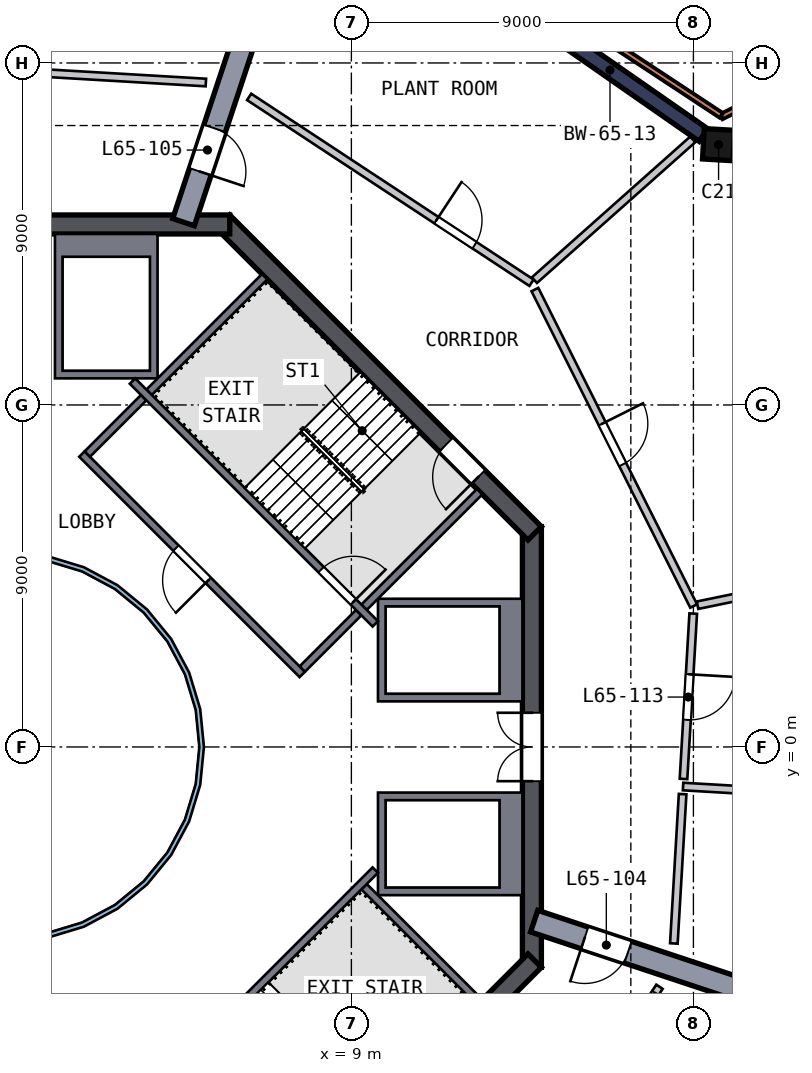
"""IFC4 building model, lengths in metres.
Left out: names, types, materials, properties, quantities, classifications, styles, units other than length and angle.
Written with IfcOpenShell. Run it as: python <this file> out.ifc"""

import sys

from ifc_helpers import new_model, si_unit, direction, frame, frame_2d, origin, origin_2d, place, context, subcontext, project, spatial, polyline, rectangle, outline, extrude, element, fill, save


model = new_model("IFC4")
c1 = context("Model", 3, precision=1e-05, world=origin(), true_north=direction((0.0, 1.0)))
c2 = subcontext(c1, "Body", "Model", "MODEL_VIEW")
j1 = project(units=[si_unit("LENGTHUNIT", "METRE"), si_unit("PLANEANGLEUNIT", "RADIAN")], contexts=[c1])
p1 = place(None, origin())
s1 = spatial("IfcSite", under=j1, at=p1, CompositionType="ELEMENT")
p2 = place(p1, origin())
s2 = spatial("IfcBuilding", under=s1, at=p2, CompositionType="ELEMENT")
p3 = place(p2, frame((0.0, 0.0, 263.0)))
s3 = spatial("IfcBuildingStorey", under=s2, at=p3, CompositionType="ELEMENT", Elevation=263.0)
p4 = place(p3, frame((18.716, 15.788, 0.0), z_axis=(-0.044438242, 0.05179951, 0.997668308), x_axis=(0.997291806, -0.056281729, 0.047343652)))
e1 = element("IfcColumn", 1, at=p4, inside=s3, PredefinedType="COLUMN", context=c2, shape_type="SweptSolid", body=[
    extrude(rectangle(XDim=0.8, YDim=0.8, at=origin_2d()), origin(), (0.0, 0.0, 1.0), 4.51),
])
p5 = place(p3, frame((13.75, -5.799, 0.0), z_axis=(0.0, 0.0, 1.0), x_axis=(0.0, 1.0, 0.0)))
e2 = element("IfcWall", 2, at=p5, inside=s3, PredefinedType="SHEAR", context=c2, shape_type="SweptSolid", body=[
    extrude(rectangle(XDim=11.598, YDim=0.5, at=frame_2d((5.799, 0.0))), origin(), (0.0, 0.0, 1.0), 6.0),
])
p6 = place(p5, frame((4.899, 0.0, 0.0)))
e3 = element("IfcOpeningElement", 3, at=p6, cuts=e2, PredefinedType="OPENING", context=c2, shape_type="SweptSolid", body=[
    extrude(rectangle(XDim=1.8, YDim=2.1, at=frame_2d((0.9, 1.05))), frame((0.0, 0.26, 0.0), z_axis=(0.0, -1.0, 0.0), x_axis=(1.0, 0.0, 0.0)), (0.0, 0.0, 1.0), 0.52),
])
p7 = place(p3, frame((13.823, 5.622, 0.0), z_axis=(0.0, 0.0, 1.0), x_axis=(-0.707106781, 0.707106781, 0.0)))
e4 = element("IfcWall", 4, at=p7, inside=s3, PredefinedType="SHEAR", context=c2, shape_type="SweptSolid", body=[
    extrude(rectangle(XDim=11.598, YDim=0.5, at=frame_2d((5.799, 0.0))), origin(), (0.0, 0.0, 1.0), 6.0),
])
p8 = place(p7, frame((2.099, 0.0, 0.0)))
e5 = element("IfcOpeningElement", 5, at=p8, cuts=e4, PredefinedType="OPENING", context=c2, shape_type="SweptSolid", body=[
    extrude(rectangle(XDim=1.2, YDim=2.1, at=frame_2d((0.6, 1.05))), frame((0.0, 0.26, 0.0), z_axis=(0.0, -1.0, 0.0), x_axis=(1.0, 0.0, 0.0)), (0.0, 0.0, 1.0), 0.52),
])
p9 = place(p3, frame((5.799, 13.75, 0.0), z_axis=(0.0, 0.0, 1.0), x_axis=(-1.0, 0.0, 0.0)))
e6 = element("IfcWall", 6, at=p9, inside=s3, PredefinedType="SHEAR", context=c2, shape_type="SweptSolid", body=[
    extrude(rectangle(XDim=11.598, YDim=0.5, at=frame_2d((5.799, 0.0))), origin(), (0.0, 0.0, 1.0), 6.0),
])
p10 = place(p9, frame((4.899, 0.0, 0.0)))
e7 = element("IfcOpeningElement", 7, at=p10, cuts=e6, PredefinedType="OPENING", context=c2, shape_type="SweptSolid", body=[
    extrude(rectangle(XDim=1.8, YDim=2.1, at=frame_2d((0.9, 1.05))), frame((0.0, 0.26, 0.0), z_axis=(0.0, -1.0, 0.0), x_axis=(1.0, 0.0, 0.0)), (0.0, 0.0, 1.0), 0.52),
])
p11 = place(p3, frame((5.622, -13.823, 0.0), z_axis=(0.0, 0.0, 1.0), x_axis=(0.707106781, 0.707106781, 0.0)))
e8 = element("IfcWall", 8, at=p11, inside=s3, PredefinedType="SHEAR", context=c2, shape_type="SweptSolid", body=[
    extrude(rectangle(XDim=11.598, YDim=0.5, at=frame_2d((5.799, 0.0))), origin(), (0.0, 0.0, 1.0), 6.0),
])
p12 = place(p11, frame((2.099, 0.0, 0.0)))
e9 = element("IfcOpeningElement", 9, at=p12, cuts=e8, PredefinedType="OPENING", context=c2, shape_type="SweptSolid", body=[
    extrude(rectangle(XDim=1.2, YDim=2.1, at=frame_2d((0.6, 1.05))), frame((0.0, 0.26, 0.0), z_axis=(0.0, -1.0, 0.0), x_axis=(1.0, 0.0, 0.0)), (0.0, 0.0, 1.0), 0.52),
])
p13 = place(p3, frame((18.264, 16.102, 0.0), z_axis=(0.0, 0.0, 1.0), x_axis=(-0.820712508, 0.571341386, 0.0)))
e10 = element("IfcWall", 10, at=p13, inside=s3, PredefinedType="SHEAR", context=c2, shape_type="SweptSolid", body=[
    extrude(rectangle(XDim=5.993, YDim=0.4, at=frame_2d((2.996, 0.0))), origin(), (0.0, 0.0, 1.0), 4.5),
])
p14 = place(p3, frame((13.81, -4.583, 0.0), z_axis=(0.0, 0.0, 1.0), x_axis=(0.949093112, -0.314995658, 0.0)))
e11 = element("IfcWall", 11, at=p14, inside=s3, PredefinedType="SHEAR", context=c2, shape_type="SweptSolid", body=[
    extrude(rectangle(XDim=9.335, YDim=0.6, at=frame_2d((4.667, 0.0))), origin(), (0.0, 0.0, 1.0), 4.5),
])
p15 = place(p14, frame((1.4, 0.0, 0.0)))
e12 = element("IfcOpeningElement", 12, at=p15, cuts=e11, PredefinedType="OPENING", context=c2, shape_type="SweptSolid", body=[
    extrude(rectangle(XDim=1.2, YDim=2.1, at=frame_2d((0.6, 1.05))), frame((0.0, 0.31, 0.0), z_axis=(0.0, -1.0, 0.0), x_axis=(1.0, 0.0, 0.0)), (0.0, 0.0, 1.0), 0.62),
])
p16 = place(p3, frame((4.583, 13.81, 0.0), z_axis=(0.0, 0.0, 1.0), x_axis=(0.314995658, 0.949093112, 0.0)))
e13 = element("IfcWall", 13, at=p16, inside=s3, PredefinedType="SHEAR", context=c2, shape_type="SweptSolid", body=[
    extrude(rectangle(XDim=9.335, YDim=0.6, at=frame_2d((4.667, 0.0))), origin(), (0.0, 0.0, 1.0), 4.5),
])
p17 = place(p16, frame((1.4, 0.0, 0.0)))
e14 = element("IfcOpeningElement", 14, at=p17, cuts=e13, PredefinedType="OPENING", context=c2, shape_type="SweptSolid", body=[
    extrude(rectangle(XDim=1.2, YDim=2.1, at=frame_2d((0.6, 1.05))), frame((0.0, 0.31, 0.0), z_axis=(0.0, -1.0, 0.0), x_axis=(1.0, 0.0, 0.0)), (0.0, 0.0, 1.0), 0.62),
])
p18 = place(p3, frame((25.046, 19.752, 0.0), z_axis=(0.0, 0.0, 1.0), x_axis=(-0.893845478, -0.448375134, 0.0)))
e15 = element("IfcWall", 15, at=p18, inside=s3, PredefinedType="SOLIDWALL", context=c2, shape_type="SweptSolid", body=[
    extrude(rectangle(XDim=7.06, YDim=0.15, at=frame_2d((3.53, 0.0))), origin(), (0.0, 0.0, 1.0), 4.5),
])
p19 = place(p3, frame((18.737, 16.618, 0.0), z_axis=(0.0, 0.0, 1.0), x_axis=(-0.835226418, 0.549906202, 0.0)))
e16 = element("IfcWall", 16, at=p19, inside=s3, PredefinedType="SOLIDWALL", context=c2, shape_type="SweptSolid", body=[
    extrude(rectangle(XDim=13.046, YDim=0.15, at=frame_2d((6.523, 0.0))), origin(), (0.0, 0.0, 1.0), 4.5),
])
p20 = place(p3, origin())
e17 = element("IfcWall", 17, at=p20, inside=s3, PredefinedType="SOLIDWALL", context=c2, shape_type="SweptSolid", body=[
    extrude(outline(polyline([(13.5, -1.2), (13.5, -3.9), (9.7, -3.9), (9.7, -1.2), (13.5, -1.2)]), holes=[polyline([(9.9, -3.7), (12.9, -3.7), (12.9, -1.4), (9.9, -1.4), (9.9, -3.7)])]), origin(), (0.0, 0.0, 1.0), 5.55),
])
p21 = place(p3, origin())
e18 = element("IfcWall", 18, at=p21, inside=s3, PredefinedType="SOLIDWALL", context=c2, shape_type="SweptSolid", body=[
    extrude(outline(polyline([(9.7, 3.9), (13.5, 3.9), (13.5, 1.2), (9.7, 1.2), (9.7, 3.9)]), holes=[polyline([(12.9, 1.4), (12.9, 3.7), (9.9, 3.7), (9.9, 1.4), (12.9, 1.4)])]), origin(), (0.0, 0.0, 1.0), 5.55),
])
p22 = place(p3, origin())
e19 = element("IfcWall", 19, at=p22, inside=s3, PredefinedType="SOLIDWALL", context=c2, shape_type="SweptSolid", body=[
    extrude(outline(polyline([(1.2, 13.5), (3.9, 13.5), (3.9, 9.7), (1.2, 9.7), (1.2, 13.5)]), holes=[polyline([(3.7, 9.9), (3.7, 12.9), (1.4, 12.9), (1.4, 9.9), (3.7, 9.9)])]), origin(), (0.0, 0.0, 1.0), 5.55),
])
p23 = place(p3, frame((3.24, 9.629, 0.0), z_axis=(0.0, 0.0, 1.0), x_axis=(0.707106781, -0.707106781, 0.0)))
e20 = element("IfcWall", 20, at=p23, inside=s3, PredefinedType="SOLIDWALL", context=c2, shape_type="SweptSolid", body=[
    extrude(rectangle(XDim=9.036, YDim=0.2, at=frame_2d((4.518, 0.0))), origin(), (0.0, 0.0, 1.0), 5.55),
])
p24 = place(p23, frame((7.018, 0.0, 0.0)))
e21 = element("IfcOpeningElement", 21, at=p24, cuts=e20, PredefinedType="OPENING", context=c2, shape_type="SweptSolid", body=[
    extrude(rectangle(XDim=1.2, YDim=2.1, at=frame_2d((0.6, 1.05))), frame((0.0, 0.11, 0.0), z_axis=(0.0, -1.0, 0.0), x_axis=(1.0, 0.0, 0.0)), (0.0, 0.0, 1.0), 0.22),
])
for number, where, z_axis, x_axis in (
    (22, (9.334, 3.677, 0.0), (0.0, 0.0, 1.0), (0.707, 0.707, 0.0)),
    (23, (3.677, 9.334, 0.0), (0.0, 0.0, 1.0), (0.707, 0.707, 0.0)),
):
    element("IfcWall", number, at=place(p3, frame(where, z_axis=z_axis, x_axis=x_axis)), inside=s3, PredefinedType="SOLIDWALL", context=c2, shape_type="SweptSolid", body=[
        extrude(rectangle(XDim=4.3, YDim=0.2, at=frame_2d((2.15, 0.0))), origin(), (0.0, 0.0, 1.0), 5.55),
    ])
p25 = place(p3, frame((9.629, -3.24, 0.0), z_axis=(0.0, 0.0, 1.0), x_axis=(-0.707120946, -0.707092617, 0.0)))
e24 = element("IfcWall", 24, at=p25, inside=s3, PredefinedType="SOLIDWALL", context=c2, shape_type="SweptSolid", body=[
    extrude(rectangle(XDim=8.618, YDim=0.2, at=frame_2d((4.309, 0.0))), origin(), (0.0, 0.0, 1.0), 5.55),
])
p26 = place(p25, frame((7.018, 0.0, 0.0)))
e25 = element("IfcOpeningElement", 25, at=p26, cuts=e24, PredefinedType="OPENING", context=c2, shape_type="SweptSolid", body=[
    extrude(rectangle(XDim=1.2, YDim=2.1, at=frame_2d((0.6, 1.05))), frame((0.0, 0.11, 0.0), z_axis=(0.0, -1.0, 0.0), x_axis=(1.0, 0.0, 0.0)), (0.0, 0.0, 1.0), 0.22),
])
p27 = place(p3, frame((9.334, -3.677, 0.0), z_axis=(0.0, 0.0, 1.0), x_axis=(0.707135168, -0.707078393, 0.0)))
e26 = element("IfcWall", 26, at=p27, inside=s3, PredefinedType="SOLIDWALL", context=c2, shape_type="SweptSolid", body=[
    extrude(rectangle(XDim=4.3, YDim=0.2, at=frame_2d((2.15, 0.0))), origin(), (0.0, 0.0, 1.0), 5.55),
])
p28 = place(p3, frame((7.708, 1.909, 0.0), z_axis=(0.0, 0.0, 1.0), x_axis=(-0.707106781, 0.707106781, 0.0)))
e27 = element("IfcWall", 27, at=p28, inside=s3, PredefinedType="SOLIDWALL", context=c2, shape_type="SweptSolid", body=[
    extrude(rectangle(XDim=8.2, YDim=0.2, at=frame_2d((4.1, 0.0))), origin(), (0.0, 0.0, 1.0), 5.55),
])
p29 = place(p28, frame((3.5, 0.0, 0.0)))
e28 = element("IfcOpeningElement", 28, at=p29, cuts=e27, PredefinedType="OPENING", context=c2, shape_type="SweptSolid", body=[
    extrude(rectangle(XDim=1.2, YDim=2.1, at=frame_2d((0.6, 1.05))), frame((0.0, 0.11, 0.0), z_axis=(0.0, -1.0, 0.0), x_axis=(1.0, 0.0, 0.0)), (0.0, 0.0, 1.0), 0.22),
])
for number, where, z_axis, x_axis in (
    (29, (7.708, 2.051, 0.0), (0.0, 0.0, 1.0), (0.707, 0.707, 0.0)),
    (30, (2.051, 7.708, 0.0), (0.0, 0.0, 1.0), (0.707, 0.707, 0.0)),
):
    element("IfcWall", number, at=place(p3, frame(where, z_axis=z_axis, x_axis=x_axis)), inside=s3, PredefinedType="SOLIDWALL", context=c2, shape_type="SweptSolid", body=[
        extrude(rectangle(XDim=2.1, YDim=0.2, at=frame_2d((1.05, 0.0))), origin(), (0.0, 0.0, 1.0), 5.55),
    ])
p30 = place(p3, origin())
e31 = element("IfcWall", 31, at=p30, inside=s3, PredefinedType="SOLIDWALL", context=c2, shape_type="SweptSolid", body=[
    extrude(outline(polyline([(5.021, -0.999), (4.73, -1.959), (4.257, -2.844), (3.62, -3.62), (2.844, -4.257), (1.959, -4.73), (0.999, -5.021), (0.0, -5.12), (-0.999, -5.021), (-1.959, -4.73), (-2.844, -4.257), (-3.62, -3.62), (-4.257, -2.844), (-4.73, -1.959), (-5.021, -0.999), (-5.12, 0.0), (-5.021, 0.999), (-4.73, 1.959), (-4.257, 2.844), (-3.62, 3.62), (-2.844, 4.257), (-1.959, 4.73), (-0.999, 5.021), (0.0, 5.12), (0.999, 5.021), (1.959, 4.73), (2.844, 4.257), (3.62, 3.62), (4.257, 2.844), (4.73, 1.959), (5.021, 0.999), (5.12, 0.0), (5.021, -0.999)]), holes=[polyline([(4.904, 0.976), (4.619, 1.913), (4.157, 2.778), (3.535, 3.535), (2.778, 4.157), (1.913, 4.619), (0.976, 4.904), (0.0, 5.0), (-0.976, 4.904), (-1.913, 4.619), (-2.778, 4.157), (-3.535, 3.535), (-4.157, 2.778), (-4.619, 1.913), (-4.904, 0.976), (-5.0, 0.0), (-4.904, -0.976), (-4.619, -1.913), (-4.157, -2.778), (-3.535, -3.535), (-2.778, -4.157), (-1.913, -4.619), (-0.976, -4.904), (0.0, -5.0), (0.976, -4.904), (1.913, -4.619), (2.778, -4.157), (3.535, -3.535), (4.157, -2.778), (4.619, -1.913), (4.904, -0.976), (5.0, 0.0), (4.904, 0.976)])]), origin(), (0.0, 0.0, 1.0), 5.55),
])
p31 = place(p3, frame((-3.089, 17.97, 0.0), z_axis=(0.0, 0.0, 1.0), x_axis=(0.998281387, -0.058602667, 0.0)))
e32 = element("IfcWall", 32, at=p31, inside=s3, PredefinedType="SOLIDWALL", context=c2, shape_type="SweptSolid", body=[
    extrude(rectangle(XDim=8.274, YDim=0.2, at=frame_2d((4.137, 0.0))), origin(), (0.0, 0.0, 1.0), 4.5),
])
p32 = place(p31, frame((0.2, 0.0, 0.0)))
e33 = element("IfcOpeningElement", 33, at=p32, cuts=e32, PredefinedType="OPENING", context=c2, shape_type="SweptSolid", body=[
    extrude(rectangle(XDim=1.2, YDim=2.1, at=frame_2d((0.6, 1.05))), frame((0.0, 0.11, 0.0), z_axis=(0.0, -1.0, 0.0), x_axis=(1.0, 0.0, 0.0)), (0.0, 0.0, 1.0), 0.22),
])
p33 = place(p3, frame((6.31, 17.107, 0.0), z_axis=(0.0, 0.0, 1.0), x_axis=(0.835228667, -0.549902786, 0.0)))
e34 = element("IfcWall", 34, at=p33, inside=s3, PredefinedType="SOLIDWALL", context=c2, shape_type="SweptSolid", body=[
    extrude(rectangle(XDim=8.896, YDim=0.2, at=frame_2d((4.448, 0.0))), origin(), (0.0, 0.0, 1.0), 4.5),
])
p34 = place(p33, frame((5.9, 0.0, 0.0)))
e35 = element("IfcOpeningElement", 35, at=p34, cuts=e34, PredefinedType="OPENING", context=c2, shape_type="SweptSolid", body=[
    extrude(rectangle(XDim=1.2, YDim=2.1, at=frame_2d((0.6, 1.05))), frame((0.0, 0.11, 0.0), z_axis=(0.0, -1.0, 0.0), x_axis=(1.0, 0.0, 0.0)), (0.0, 0.0, 1.0), 0.22),
])
p35 = place(p3, frame((17.107, -6.31, 0.0), z_axis=(0.0, 0.0, 1.0), x_axis=(-0.549883224, -0.835241546, 0.0)))
e36 = element("IfcWall", 36, at=p35, inside=s3, PredefinedType="SOLIDWALL", context=c2, shape_type="SweptSolid", body=[
    extrude(rectangle(XDim=8.203, YDim=0.2, at=frame_2d((4.102, 0.0))), origin(), (0.0, 0.0, 1.0), 4.5),
])
p36 = place(p35, frame((0.2, 0.0, 0.0)))
e37 = element("IfcOpeningElement", 37, at=p36, cuts=e36, PredefinedType="OPENING", context=c2, shape_type="SweptSolid", body=[
    extrude(rectangle(XDim=1.2, YDim=2.1, at=frame_2d((0.6, 1.05))), frame((0.0, 0.11, 0.0), z_axis=(0.0, -1.0, 0.0), x_axis=(1.0, 0.0, 0.0)), (0.0, 0.0, 1.0), 0.22),
])
p37 = place(p3, frame((13.817, 12.285, 0.0), z_axis=(0.0, 0.0, 1.0), x_axis=(0.747356168, 0.664423629, 0.0)))
e38 = element("IfcWall", 38, at=p37, inside=s3, PredefinedType="SOLIDWALL", context=c2, shape_type="SweptSolid", body=[
    extrude(rectangle(XDim=5.576, YDim=0.2, at=frame_2d((2.788, 0.0))), origin(), (0.0, 0.0, 1.0), 4.5),
])
p38 = place(p3, frame((13.829, 12.037, 0.0), z_axis=(0.0, 0.0, 1.0), x_axis=(0.448376743, -0.893844671, 0.0)))
e39 = element("IfcWall", 39, at=p38, inside=s3, PredefinedType="SOLIDWALL", context=c2, shape_type="SweptSolid", body=[
    extrude(rectangle(XDim=9.316, YDim=0.2, at=frame_2d((4.658, 0.0))), origin(), (0.0, 0.0, 1.0), 4.5),
])
p39 = place(p38, frame((3.95, 0.0, 0.0)))
e40 = element("IfcOpeningElement", 40, at=p39, cuts=e39, PredefinedType="OPENING", context=c2, shape_type="SweptSolid", body=[
    extrude(rectangle(XDim=1.2, YDim=2.1, at=frame_2d((0.6, 1.05))), frame((0.0, 0.11, 0.0), z_axis=(0.0, -1.0, 0.0), x_axis=(1.0, 0.0, 0.0)), (0.0, 0.0, 1.0), 0.22),
])
p40 = place(p3, frame((17.485, -5.17, 0.0), z_axis=(0.0, 0.0, 1.0), x_axis=(0.058605687, 0.99828121, 0.0)))
e41 = element("IfcWall", 41, at=p40, inside=s3, PredefinedType="SOLIDWALL", context=c2, shape_type="SweptSolid", body=[
    extrude(rectangle(XDim=3.937, YDim=0.2, at=frame_2d((1.968, 0.0))), origin(), (0.0, 0.0, 1.0), 4.5),
])
p41 = place(p3, frame((17.995, 3.51, 0.0), z_axis=(0.0, 0.0, 1.0), x_axis=(-0.058653059, -0.998278427, 0.0)))
e42 = element("IfcWall", 42, at=p41, inside=s3, PredefinedType="SOLIDWALL", context=c2, shape_type="SweptSolid", body=[
    extrude(rectangle(XDim=4.358, YDim=0.2, at=frame_2d((2.179, 0.0))), origin(), (0.0, 0.0, 1.0), 4.5),
])
p42 = place(p41, frame((1.6, 0.0, 0.0)))
e43 = element("IfcOpeningElement", 43, at=p42, cuts=e42, PredefinedType="OPENING", context=c2, shape_type="SweptSolid", body=[
    extrude(rectangle(XDim=1.2, YDim=2.1, at=frame_2d((0.6, 1.05))), frame((0.0, 0.11, 0.0), z_axis=(0.0, -1.0, 0.0), x_axis=(1.0, 0.0, 0.0)), (0.0, 0.0, 1.0), 0.22),
])
p43 = place(p3, frame((17.728, -1.041, 0.0), z_axis=(0.0, 0.0, 1.0), x_axis=(0.998279672, -0.05863187, 0.0)))
e44 = element("IfcWall", 44, at=p43, inside=s3, PredefinedType="SOLIDWALL", context=c2, shape_type="SweptSolid", body=[
    extrude(rectangle(XDim=6.35, YDim=0.2, at=frame_2d((3.175, 0.0))), origin(), (0.0, 0.0, 1.0), 4.5),
])
p44 = place(p3, frame((18.108, 3.73, 0.0), z_axis=(0.0, 0.0, 1.0), x_axis=(0.979432762, 0.201770824, 0.0)))
e45 = element("IfcWall", 45, at=p44, inside=s3, PredefinedType="SOLIDWALL", context=c2, shape_type="SweptSolid", body=[
    extrude(rectangle(XDim=5.726, YDim=0.2, at=frame_2d((2.863, 0.0))), origin(), (0.0, 0.0, 1.0), 4.5),
])
p45 = place(p24, origin())
e46 = element("IfcDoor", 46, at=p45, inside=s3, OperationType="SINGLE_SWING_RIGHT", PredefinedType="DOOR", context=c2, shape_type="SweptSolid", body=[
    extrude(rectangle(XDim=1.2, YDim=2.1, at=frame_2d((0.6, 1.05))), frame((0.0, 0.025, 0.0), z_axis=(0.0, -1.0, 0.0), x_axis=(1.0, 0.0, 0.0)), (0.0, 0.0, 1.0), 0.05),
])
fill(e21, e46)
p46 = place(p6, origin())
e47 = element("IfcDoor", 47, at=p46, inside=s3, OperationType="DOUBLE_DOOR_SINGLE_SWING", PredefinedType="DOOR", context=c2, shape_type="SweptSolid", body=[
    extrude(rectangle(XDim=1.8, YDim=2.1, at=frame_2d((0.9, 1.05))), frame((0.0, 0.025, 0.0), z_axis=(0.0, -1.0, 0.0), x_axis=(1.0, 0.0, 0.0)), (0.0, 0.0, 1.0), 0.05),
])
fill(e3, e47)
p47 = place(p8, origin())
e48 = element("IfcDoor", 48, at=p47, inside=s3, OperationType="SINGLE_SWING_LEFT", PredefinedType="DOOR", context=c2, shape_type="SweptSolid", body=[
    extrude(rectangle(XDim=1.2, YDim=2.1, at=frame_2d((0.6, 1.05))), frame((0.0, 0.025, 0.0), z_axis=(0.0, -1.0, 0.0), x_axis=(1.0, 0.0, 0.0)), (0.0, 0.0, 1.0), 0.05),
])
fill(e5, e48)
p48 = place(p29, origin())
e49 = element("IfcDoor", 49, at=p48, inside=s3, OperationType="SINGLE_SWING_LEFT", PredefinedType="DOOR", context=c2, shape_type="SweptSolid", body=[
    extrude(rectangle(XDim=1.2, YDim=2.1, at=frame_2d((0.6, 1.05))), frame((0.0, 0.025, 0.0), z_axis=(0.0, -1.0, 0.0), x_axis=(1.0, 0.0, 0.0)), (0.0, 0.0, 1.0), 0.05),
])
fill(e28, e49)
p49 = place(p15, origin())
e50 = element("IfcDoor", 50, at=p49, inside=s3, OperationType="SINGLE_SWING_LEFT", PredefinedType="DOOR", context=c2, shape_type="SweptSolid", body=[
    extrude(rectangle(XDim=1.2, YDim=2.1, at=frame_2d((0.6, 1.05))), frame((0.0, 0.025, 0.0), z_axis=(0.0, -1.0, 0.0), x_axis=(1.0, 0.0, 0.0)), (0.0, 0.0, 1.0), 0.05),
])
fill(e12, e50)
p50 = place(p17, origin())
e51 = element("IfcDoor", 51, at=p50, inside=s3, OperationType="SINGLE_SWING_LEFT", PredefinedType="DOOR", context=c2, shape_type="SweptSolid", body=[
    extrude(rectangle(XDim=1.2, YDim=2.1, at=frame_2d((0.6, 1.05))), frame((0.0, 0.025, 0.0), z_axis=(0.0, -1.0, 0.0), x_axis=(1.0, 0.0, 0.0)), (0.0, 0.0, 1.0), 0.05),
])
fill(e14, e51)
p51 = place(p36, origin())
e52 = element("IfcDoor", 52, at=p51, inside=s3, OperationType="SINGLE_SWING_LEFT", PredefinedType="DOOR", context=c2, shape_type="SweptSolid", body=[
    extrude(rectangle(XDim=1.2, YDim=2.1, at=frame_2d((0.6, 1.05))), frame((0.0, 0.025, 0.0), z_axis=(0.0, -1.0, 0.0), x_axis=(1.0, 0.0, 0.0)), (0.0, 0.0, 1.0), 0.05),
])
fill(e37, e52)
p52 = place(p42, origin())
e53 = element("IfcDoor", 53, at=p52, inside=s3, OperationType="SINGLE_SWING_LEFT", PredefinedType="DOOR", context=c2, shape_type="SweptSolid", body=[
    extrude(rectangle(XDim=1.2, YDim=2.1, at=frame_2d((0.6, 1.05))), frame((0.0, 0.025, 0.0), z_axis=(0.0, -1.0, 0.0), x_axis=(1.0, 0.0, 0.0)), (0.0, 0.0, 1.0), 0.05),
])
fill(e43, e53)
p53 = place(p39, origin())
e54 = element("IfcDoor", 54, at=p53, inside=s3, OperationType="SINGLE_SWING_LEFT", PredefinedType="DOOR", context=c2, shape_type="SweptSolid", body=[
    extrude(rectangle(XDim=1.2, YDim=2.1, at=frame_2d((0.6, 1.05))), frame((0.0, 0.025, 0.0), z_axis=(0.0, -1.0, 0.0), x_axis=(1.0, 0.0, 0.0)), (0.0, 0.0, 1.0), 0.05),
])
fill(e40, e54)
p54 = place(p34, origin())
e55 = element("IfcDoor", 55, at=p54, inside=s3, OperationType="SINGLE_SWING_LEFT", PredefinedType="DOOR", context=c2, shape_type="SweptSolid", body=[
    extrude(rectangle(XDim=1.2, YDim=2.1, at=frame_2d((0.6, 1.05))), frame((0.0, 0.025, 0.0), z_axis=(0.0, -1.0, 0.0), x_axis=(1.0, 0.0, 0.0)), (0.0, 0.0, 1.0), 0.05),
])
fill(e35, e55)
save(model, sys.argv[1])
